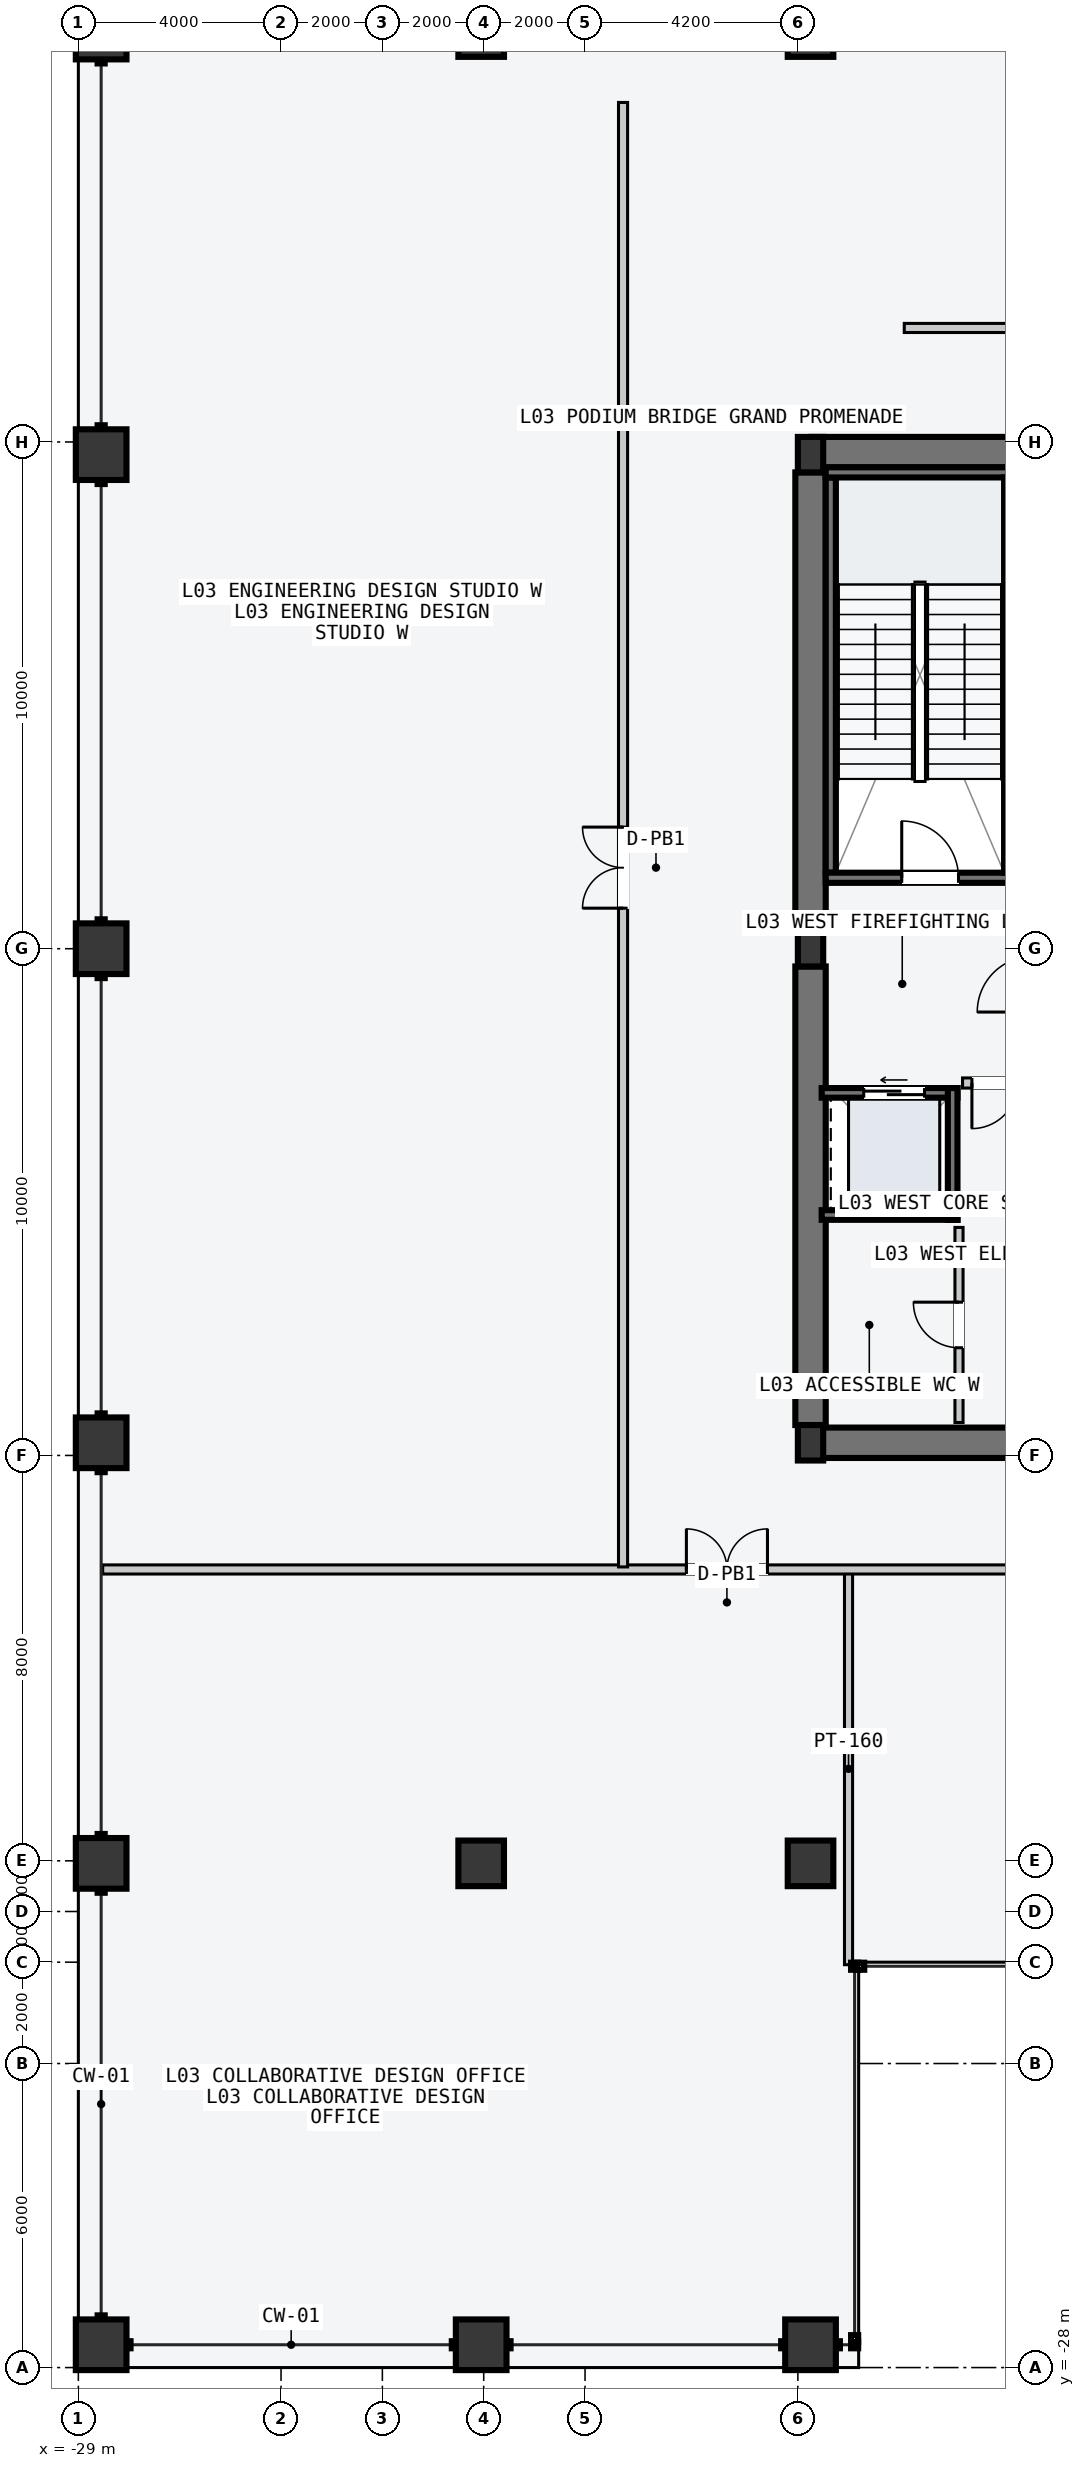
"""IFC4 building model, lengths in metres.
Left out: names, types, materials, properties, quantities, classifications, styles, units other than length and angle.
Written with IfcOpenShell. Run it as: python <this file> out.ifc"""

import sys

from ifc_helpers import new_model, si_unit, direction, frame, frame_2d, origin, origin_2d, place, context, subcontext, project, spatial, rectangle, hollow_rectangle, i_section, extrude, element, fill, save


model = new_model("IFC4")
c1 = context("Model", 3, precision=1e-05, world=origin(), true_north=direction((0.0, 1.0)))
c2 = subcontext(c1, "Body", "Model", "MODEL_VIEW")
j1 = project(units=[si_unit("LENGTHUNIT", "METRE"), si_unit("PLANEANGLEUNIT", "RADIAN")], contexts=[c1])
p1 = place(None, origin())
s1 = spatial("IfcSite", under=j1, at=p1, CompositionType="ELEMENT")
p2 = place(p1, origin())
s2 = spatial("IfcBuilding", under=s1, at=p2, CompositionType="ELEMENT")
p3 = place(p2, frame((0.0, 0.0, 14.4)))
s3 = spatial("IfcBuildingStorey", under=s2, at=p3, CompositionType="ELEMENT", Elevation=14.4)
for number, where, z_axis, x_axis in (
    (1, (-14.53, -9.75, -0.22), (0.0, 0.0, 1.0), (1.0, 0.0, 0.0)),
    (2, (-14.53, 9.8, -0.22), (0.0, 0.0, 1.0), (1.0, 0.0, 0.0)),
):
    element("IfcWall", number, at=place(p3, frame(where, z_axis=z_axis, x_axis=x_axis)), inside=s3, PredefinedType="SHEAR", context=c2, shape_type="SweptSolid", body=[
        extrude(rectangle(XDim=6.46, YDim=0.6, at=frame_2d((3.23, 0.0))), origin(), (0.0, 0.0, 1.0), 4.8),
    ])
for number, where, z_axis, x_axis in (
    (3, (-14.55, -9.4, -0.22), (0.0, 0.0, 1.0), (0.0, 1.0, 0.0)),
    (4, (-14.55, 0.35, -0.22), (0.0, 0.0, 1.0), (0.0, 1.0, 0.0)),
):
    element("IfcWall", number, at=place(p3, frame(where, z_axis=z_axis, x_axis=x_axis)), inside=s3, PredefinedType="SHEAR", context=c2, shape_type="SweptSolid", body=[
        extrude(rectangle(XDim=9.05, YDim=0.6, at=frame_2d((4.525, 0.0))), origin(), (0.0, 0.0, 1.0), 4.8),
    ])
p4 = place(p3, frame((-14.15, 1.5, -0.22), z_axis=(0.0, 0.0, 1.0), x_axis=(0.0, 1.0, 0.0)))
e5 = element("IfcWall", 5, at=p4, inside=s3, PredefinedType="SOLIDWALL", context=c2, shape_type="SweptSolid", body=[
    extrude(rectangle(XDim=7.8, YDim=0.2, at=frame_2d((3.9, 0.0))), origin(), (0.0, 0.0, 1.0), 4.8),
])
p5 = place(p3, frame((-14.25, 1.4, -0.22), z_axis=(0.0, 0.0, 1.0), x_axis=(1.0, 0.0, 0.0)))
e6 = element("IfcWall", 6, at=p5, inside=s3, PredefinedType="SOLIDWALL", context=c2, shape_type="SweptSolid", body=[
    extrude(rectangle(XDim=4.1, YDim=0.2, at=frame_2d((2.05, 0.0))), origin(), (0.0, 0.0, 1.0), 4.8),
])
p6 = place(p5, frame((1.5, 0.0, 0.22)))
e7 = element("IfcOpeningElement", 7, at=p6, cuts=e6, PredefinedType="OPENING", context=c2, shape_type="SweptSolid", body=[
    extrude(rectangle(XDim=1.12, YDim=2.18, at=frame_2d((0.56, 1.09))), frame((0.0, 0.11, 0.0), z_axis=(0.0, -1.0, 0.0), x_axis=(1.0, 0.0, 0.0)), (0.0, 0.0, 1.0), 0.22),
])
p7 = place(p3, frame((-14.25, 9.4, -0.22), z_axis=(0.0, 0.0, 1.0), x_axis=(1.0, 0.0, 0.0)))
e8 = element("IfcWall", 8, at=p7, inside=s3, PredefinedType="SOLIDWALL", context=c2, shape_type="SweptSolid", body=[
    extrude(rectangle(XDim=4.1, YDim=0.2, at=frame_2d((2.05, 0.0))), origin(), (0.0, 0.0, 1.0), 4.8),
])
p8 = place(p3, frame((-10.63, 1.5, -0.22), z_axis=(0.0, 0.0, 1.0), x_axis=(0.0, 1.0, 0.0)))
e9 = element("IfcWall", 9, at=p8, inside=s3, PredefinedType="SOLIDWALL", context=c2, shape_type="SweptSolid", body=[
    extrude(rectangle(XDim=7.8, YDim=0.2, at=frame_2d((3.9, 0.0))), origin(), (0.0, 0.0, 1.0), 4.8),
])
for number, where, z_axis, x_axis in (
    (10, (-14.55, -9.75, 0.0), (0.0, 0.0, 1.0), (1.0, 0.0, 0.0)),
    (11, (-14.55, 0.0, 0.0), (0.0, 0.0, 1.0), (1.0, 0.0, 0.0)),
    (12, (-14.55, 9.75, 0.0), (0.0, 0.0, 1.0), (1.0, 0.0, 0.0)),
):
    element("IfcColumn", number, at=place(p3, frame(where, z_axis=z_axis, x_axis=x_axis)), inside=s3, PredefinedType="COLUMN", context=c2, shape_type="SweptSolid", body=[
        extrude(i_section(OverallWidth=0.5, OverallDepth=0.7, WebThickness=0.028, FlangeThickness=0.045, at=origin_2d()), origin(), (0.0, 0.0, 1.0), 4.8),
    ])
for number, where, z_axis, x_axis in (
    (13, (-21.05, -18.05, 0.0), (0.0, 0.0, 1.0), (1.0, 0.0, 0.0)),
    (14, (-14.55, -18.05, 0.0), (0.0, 0.0, 1.0), (1.0, 0.0, 0.0)),
    (15, (-21.05, 18.05, 0.0), (0.0, 0.0, 1.0), (1.0, 0.0, 0.0)),
    (16, (-14.55, 18.05, 0.0), (0.0, 0.0, 1.0), (1.0, 0.0, 0.0)),
):
    element("IfcColumn", number, at=place(p3, frame(where, z_axis=z_axis, x_axis=x_axis)), inside=s3, PredefinedType="COLUMN", context=c2, shape_type="SweptSolid", body=[
        extrude(hollow_rectangle(XDim=0.9, YDim=0.9, WallThickness=0.045, at=origin_2d()), origin(), (0.0, 0.0, 1.0), 4.8),
    ])
for number, where, z_axis, x_axis in (
    (17, (-28.55, -27.55, 0.0), (0.0, 0.0, 1.0), (1.0, 0.0, 0.0)),
    (18, (-21.05, -27.55, 0.0), (0.0, 0.0, 1.0), (1.0, 0.0, 0.0)),
    (19, (-14.55, -27.55, 0.0), (0.0, 0.0, 1.0), (1.0, 0.0, 0.0)),
    (20, (-28.55, -18.05, 0.0), (0.0, 0.0, 1.0), (0.0, 1.0, 0.0)),
    (21, (-28.55, -9.75, 0.0), (0.0, 0.0, 1.0), (0.0, 1.0, 0.0)),
    (22, (-28.55, 0.0, 0.0), (0.0, 0.0, 1.0), (0.0, 1.0, 0.0)),
    (23, (-28.55, 9.75, 0.0), (0.0, 0.0, 1.0), (0.0, 1.0, 0.0)),
    (24, (-28.55, 18.05, 0.0), (0.0, 0.0, 1.0), (0.0, 1.0, 0.0)),
):
    element("IfcColumn", number, at=place(p3, frame(where, z_axis=z_axis, x_axis=x_axis)), inside=s3, PredefinedType="COLUMN", context=c2, shape_type="SweptSolid", body=[
        extrude(hollow_rectangle(XDim=1.0, YDim=1.0, WallThickness=0.05, at=origin_2d()), origin(), (0.0, 0.0, 1.0), 4.8),
    ])
p9 = place(p3, frame((-14.33, -2.845, -0.22), z_axis=(0.0, 0.0, 1.0), x_axis=(1.0, 0.0, 0.0)))
e25 = element("IfcWall", 25, at=p9, inside=s3, PredefinedType="SOLIDWALL", context=c2, shape_type="SweptSolid", body=[
    extrude(rectangle(XDim=2.68, YDim=0.19, at=frame_2d((1.34, 0.0))), origin(), (0.0, 0.0, 1.0), 4.8),
])
p10 = place(p9, frame((0.83, 0.0, 0.22)))
e26 = element("IfcOpeningElement", 26, at=p10, cuts=e25, PredefinedType="OPENING", context=c2, shape_type="SweptSolid", body=[
    extrude(rectangle(XDim=1.2, YDim=2.2, at=frame_2d((0.6, 1.1))), frame((0.0, 0.105, 0.0), z_axis=(0.0, -1.0, 0.0), x_axis=(1.0, 0.0, 0.0)), (0.0, 0.0, 1.0), 0.21),
])
p11 = place(p3, frame((-14.33, -5.255, -0.22), z_axis=(0.0, 0.0, 1.0), x_axis=(1.0, 0.0, 0.0)))
e27 = element("IfcWall", 27, at=p11, inside=s3, PredefinedType="SOLIDWALL", context=c2, shape_type="SweptSolid", body=[
    extrude(rectangle(XDim=2.68, YDim=0.19, at=frame_2d((1.34, 0.0))), origin(), (0.0, 0.0, 1.0), 4.8),
])
p12 = place(p3, frame((-11.745, -5.35, -0.22), z_axis=(0.0, 0.0, 1.0), x_axis=(0.0, 1.0, 0.0)))
e28 = element("IfcWall", 28, at=p12, inside=s3, PredefinedType="SOLIDWALL", context=c2, shape_type="SweptSolid", body=[
    extrude(rectangle(XDim=2.6, YDim=0.19, at=frame_2d((1.3, 0.0))), origin(), (0.0, 0.0, 1.0), 4.8),
])
p13 = place(p3, frame((-10.28, -2.65, 0.0), z_axis=(0.0, 0.0, 1.0), x_axis=(-1.0, 0.0, 0.0)))
e29 = element("IfcWall", 29, at=p13, inside=s3, PredefinedType="PARTITIONING", context=c2, shape_type="SweptSolid", body=[
    extrude(rectangle(XDim=1.27, YDim=0.2, at=frame_2d((0.635, 0.0))), origin(), (0.0, 0.0, 1.0), 4.58),
])
p14 = place(p13, frame((0.185, 0.0, 0.0)))
e30 = element("IfcOpeningElement", 30, at=p14, cuts=e29, PredefinedType="OPENING", context=c2, shape_type="SweptSolid", body=[
    extrude(rectangle(XDim=0.9, YDim=2.15, at=frame_2d((0.45, 1.075))), frame((0.0, 0.11, 0.0), z_axis=(0.0, -1.0, 0.0), x_axis=(1.0, 0.0, 0.0)), (0.0, 0.0, 1.0), 0.22),
])
p15 = place(p3, frame((-11.62, -9.35, 0.0), z_axis=(0.0, 0.0, 1.0), x_axis=(0.0, 1.0, 0.0)))
e31 = element("IfcWall", 31, at=p15, inside=s3, PredefinedType="PARTITIONING", context=c2, shape_type="SweptSolid", body=[
    extrude(rectangle(XDim=3.85, YDim=0.16, at=frame_2d((1.925, 0.0))), origin(), (0.0, 0.0, 1.0), 4.58),
])
p16 = place(p15, frame((1.475, 0.0, 0.0)))
e32 = element("IfcOpeningElement", 32, at=p16, cuts=e31, PredefinedType="OPENING", context=c2, shape_type="SweptSolid", body=[
    extrude(rectangle(XDim=0.9, YDim=2.15, at=frame_2d((0.45, 1.075))), frame((0.0, 0.09, 0.0), z_axis=(0.0, -1.0, 0.0), x_axis=(1.0, 0.0, 0.0)), (0.0, 0.0, 1.0), 0.18),
])
p17 = place(p3, frame((-13.8, -20.05, 0.0), z_axis=(0.0, 0.0, 1.0), x_axis=(0.0, 1.0, 0.0)))
e33 = element("IfcWall", 33, at=p17, inside=s3, PredefinedType="PARTITIONING", context=c2, shape_type="SweptSolid", body=[
    extrude(rectangle(XDim=7.73, YDim=0.16, at=frame_2d((3.865, 0.0))), origin(), (0.0, 0.0, 1.0), 4.58),
])
p18 = place(p3, frame((-28.52, -12.25, 0.0), z_axis=(0.0, 0.0, 1.0), x_axis=(1.0, 0.0, 0.0)))
e34 = element("IfcWall", 34, at=p18, inside=s3, PredefinedType="PARTITIONING", context=c2, shape_type="SweptSolid", body=[
    extrude(rectangle(XDim=57.04, YDim=0.18, at=frame_2d((28.52, 0.0))), origin(), (0.0, 0.0, 1.0), 4.58),
])
p19 = place(p18, frame((11.52, 0.0, 0.0)))
e35 = element("IfcOpeningElement", 35, at=p19, cuts=e34, PredefinedType="OPENING", context=c2, shape_type="SweptSolid", body=[
    extrude(rectangle(XDim=1.6, YDim=2.3, at=frame_2d((0.8, 1.15))), frame((0.0, 0.1, 0.0), z_axis=(0.0, -1.0, 0.0), x_axis=(1.0, 0.0, 0.0)), (0.0, 0.0, 1.0), 0.2),
])
p20 = place(p18, frame((27.72, 0.0, 0.0)))
e36 = element("IfcOpeningElement", 36, at=p20, cuts=e34, PredefinedType="OPENING", context=c2, shape_type="SweptSolid", body=[
    extrude(rectangle(XDim=1.6, YDim=2.3, at=frame_2d((0.8, 1.15))), frame((0.0, 0.1, 0.0), z_axis=(0.0, -1.0, 0.0), x_axis=(1.0, 0.0, 0.0)), (0.0, 0.0, 1.0), 0.2),
])
p21 = place(p18, frame((43.92, 0.0, 0.0)))
e37 = element("IfcOpeningElement", 37, at=p21, cuts=e34, PredefinedType="OPENING", context=c2, shape_type="SweptSolid", body=[
    extrude(rectangle(XDim=1.6, YDim=2.3, at=frame_2d((0.8, 1.15))), frame((0.0, 0.1, 0.0), z_axis=(0.0, -1.0, 0.0), x_axis=(1.0, 0.0, 0.0)), (0.0, 0.0, 1.0), 0.2),
])
p22 = place(p3, frame((-12.7, 12.25, 0.0), z_axis=(0.0, 0.0, 1.0), x_axis=(1.0, 0.0, 0.0)))
e38 = element("IfcWall", 38, at=p22, inside=s3, PredefinedType="PARTITIONING", context=c2, shape_type="SweptSolid", body=[
    extrude(rectangle(XDim=25.4, YDim=0.18, at=frame_2d((12.7, 0.0))), origin(), (0.0, 0.0, 1.0), 4.58),
])
p23 = place(p22, frame((11.9, 0.0, 0.0)))
e39 = element("IfcOpeningElement", 39, at=p23, cuts=e38, PredefinedType="OPENING", context=c2, shape_type="SweptSolid", body=[
    extrude(rectangle(XDim=1.6, YDim=2.3, at=frame_2d((0.8, 1.15))), frame((0.0, 0.1, 0.0), z_axis=(0.0, -1.0, 0.0), x_axis=(1.0, 0.0, 0.0)), (0.0, 0.0, 1.0), 0.2),
])
p24 = place(p3, frame((-18.25, -12.2, 0.0), z_axis=(0.0, 0.0, 1.0), x_axis=(0.0, 1.0, 0.0)))
e40 = element("IfcWall", 40, at=p24, inside=s3, PredefinedType="PARTITIONING", context=c2, shape_type="SweptSolid", body=[
    extrude(rectangle(XDim=28.9, YDim=0.18, at=frame_2d((14.45, 0.0))), origin(), (0.0, 0.0, 1.0), 4.58),
])
p25 = place(p24, frame((13.0, 0.0, 0.0)))
e41 = element("IfcOpeningElement", 41, at=p25, cuts=e40, PredefinedType="OPENING", context=c2, shape_type="SweptSolid", body=[
    extrude(rectangle(XDim=1.6, YDim=2.3, at=frame_2d((0.8, 1.15))), frame((0.0, 0.1, 0.0), z_axis=(0.0, -1.0, 0.0), x_axis=(1.0, 0.0, 0.0)), (0.0, 0.0, 1.0), 0.2),
])
p26 = place(p6, origin())
e42 = element("IfcDoor", 42, at=p26, inside=s3, OperationType="SINGLE_SWING_LEFT", PredefinedType="DOOR", context=c2, shape_type="SweptSolid", body=[
    extrude(rectangle(XDim=1.12, YDim=2.18, at=frame_2d((0.56, 1.09))), frame((0.0, 0.025, 0.0), z_axis=(0.0, -1.0, 0.0), x_axis=(1.0, 0.0, 0.0)), (0.0, 0.0, 1.0), 0.05),
])
fill(e7, e42)
p27 = place(p10, origin())
e43 = element("IfcDoor", 43, at=p27, inside=s3, OperationType="SLIDING_TO_LEFT", PredefinedType="DOOR", context=c2, shape_type="SweptSolid", body=[
    extrude(rectangle(XDim=1.2, YDim=2.2, at=frame_2d((0.6, 1.1))), frame((0.0, 0.025, 0.0), z_axis=(0.0, -1.0, 0.0), x_axis=(1.0, 0.0, 0.0)), (0.0, 0.0, 1.0), 0.05),
])
fill(e26, e43)
p28 = place(p14, origin())
e44 = element("IfcDoor", 44, at=p28, inside=s3, OperationType="SINGLE_SWING_RIGHT", PredefinedType="DOOR", context=c2, shape_type="SweptSolid", body=[
    extrude(rectangle(XDim=0.9, YDim=2.15, at=frame_2d((0.45, 1.075))), frame((0.0, 0.025, 0.0), z_axis=(0.0, -1.0, 0.0), x_axis=(1.0, 0.0, 0.0)), (0.0, 0.0, 1.0), 0.05),
])
fill(e30, e44)
p29 = place(p16, origin())
e45 = element("IfcDoor", 45, at=p29, inside=s3, OperationType="SINGLE_SWING_RIGHT", PredefinedType="DOOR", context=c2, shape_type="SweptSolid", body=[
    extrude(rectangle(XDim=0.9, YDim=2.15, at=frame_2d((0.45, 1.075))), frame((0.0, 0.025, 0.0), z_axis=(0.0, -1.0, 0.0), x_axis=(1.0, 0.0, 0.0)), (0.0, 0.0, 1.0), 0.05),
])
fill(e32, e45)
p30 = place(p19, origin())
e46 = element("IfcDoor", 46, at=p30, inside=s3, OperationType="DOUBLE_DOOR_SINGLE_SWING", PredefinedType="DOOR", context=c2, shape_type="SweptSolid", body=[
    extrude(rectangle(XDim=1.6, YDim=2.3, at=frame_2d((0.8, 1.15))), frame((0.0, 0.025, 0.0), z_axis=(0.0, -1.0, 0.0), x_axis=(1.0, 0.0, 0.0)), (0.0, 0.0, 1.0), 0.05),
])
fill(e35, e46)
p31 = place(p25, origin())
e47 = element("IfcDoor", 47, at=p31, inside=s3, OperationType="DOUBLE_DOOR_SINGLE_SWING", PredefinedType="DOOR", context=c2, shape_type="SweptSolid", body=[
    extrude(rectangle(XDim=1.6, YDim=2.3, at=frame_2d((0.8, 1.15))), frame((0.0, 0.025, 0.0), z_axis=(0.0, -1.0, 0.0), x_axis=(1.0, 0.0, 0.0)), (0.0, 0.0, 1.0), 0.05),
])
fill(e41, e47)
save(model, sys.argv[1])
